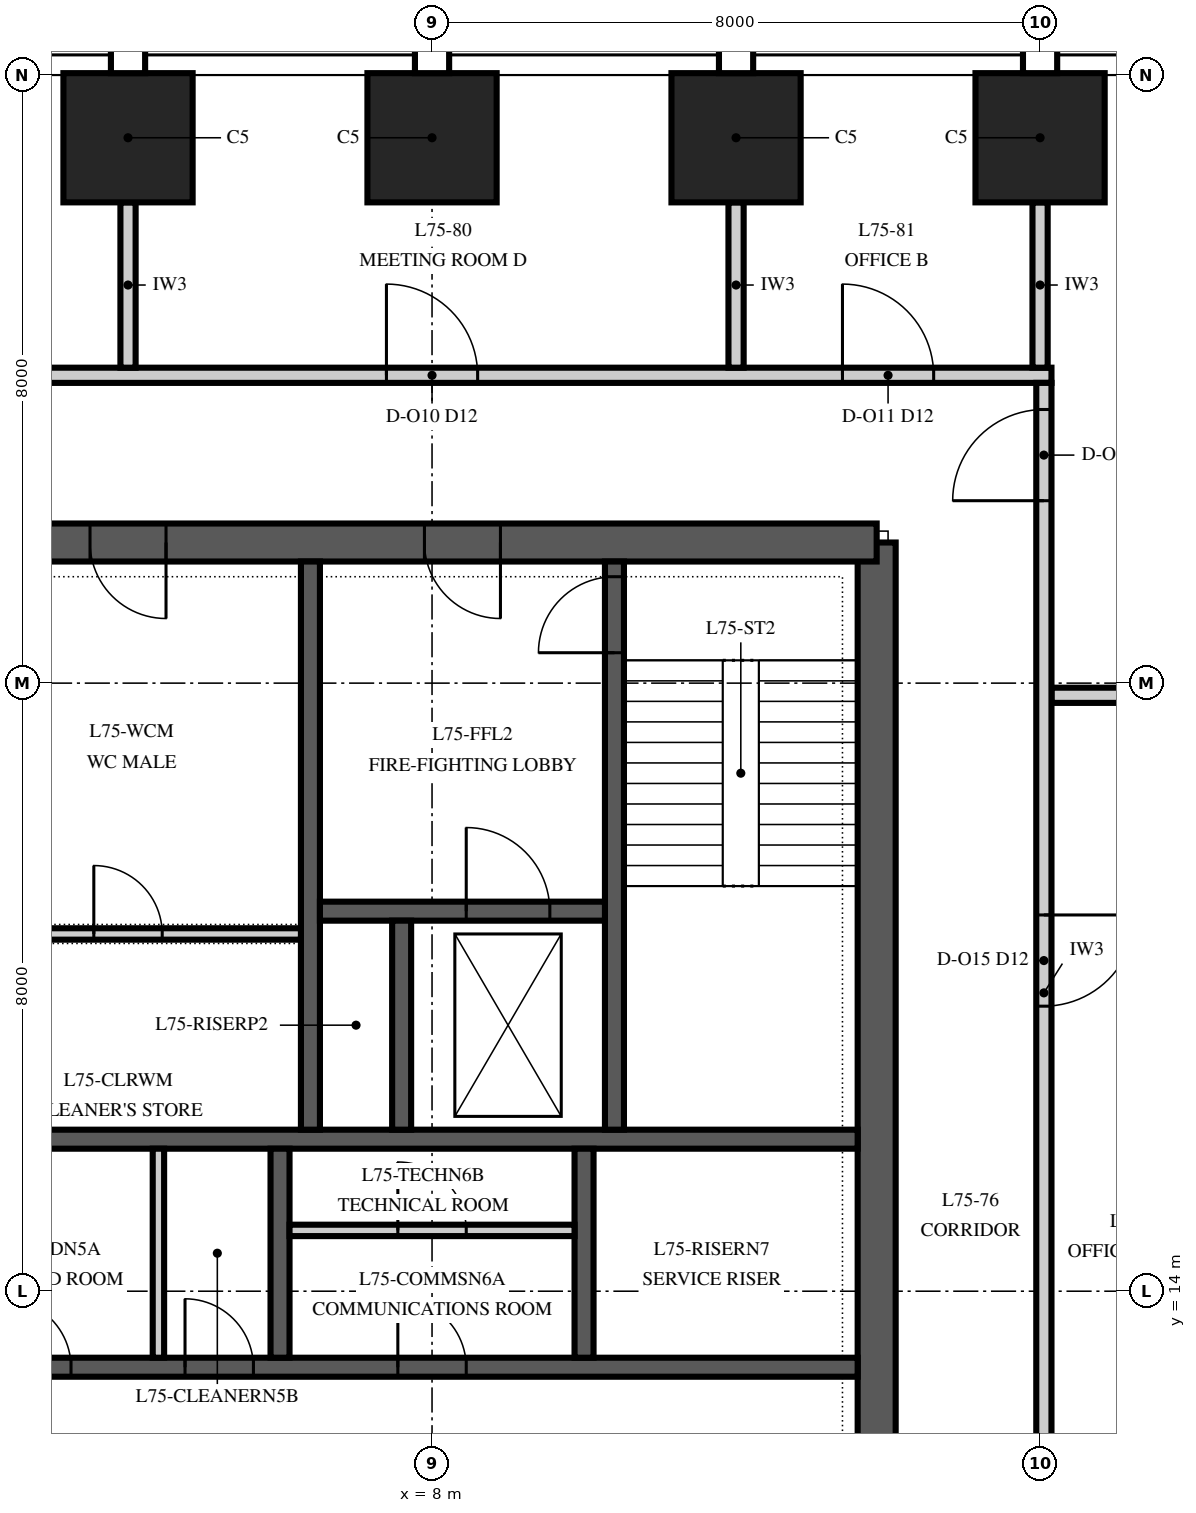
"""IFC4 building model, lengths in metres.
Left out: names, types, materials, properties, quantities, classifications, styles, units other than length and angle.
Written with IfcOpenShell. Run it as: python <this file> out.ifc"""

import sys

from ifc_helpers import new_model, si_unit, direction, frame, frame_2d, origin, origin_2d, place, context, subcontext, project, spatial, polyline, rectangle, outline, extrude, element, fill, save


model = new_model("IFC4")
c1 = context("Model", 3, precision=1e-05, world=origin(), true_north=direction((0.0, 1.0)))
c2 = subcontext(c1, "Body", "Model", "MODEL_VIEW")
j1 = project(units=[si_unit("LENGTHUNIT", "METRE"), si_unit("PLANEANGLEUNIT", "RADIAN")], contexts=[c1])
p1 = place(None, origin())
s1 = spatial("IfcSite", under=j1, at=p1, CompositionType="ELEMENT")
p2 = place(p1, origin())
s2 = spatial("IfcBuilding", under=s1, at=p2, CompositionType="ELEMENT")
p3 = place(p2, frame((0.0, 0.0, 320.0)))
s3 = spatial("IfcBuildingStorey", under=s2, at=p3, CompositionType="ELEMENT", Elevation=320.0)
for number, where, z_axis, x_axis in (
    (1, (16.0, 29.175, 0.0), (0.0, 0.0, 1.0), (-1.0, 0.0, 0.0)),
    (2, (12.0, 29.175, 0.0), (0.0, 0.0, 1.0), (-1.0, 0.0, 0.0)),
    (3, (8.0, 29.175, 0.0), (0.0, 0.0, 1.0), (-1.0, 0.0, 0.0)),
    (4, (4.0, 29.175, 0.0), (0.0, 0.0, 1.0), (-1.0, 0.0, 0.0)),
):
    element("IfcColumn", number, at=place(p3, frame(where, z_axis=z_axis, x_axis=x_axis)), inside=s3, PredefinedType="COLUMN", context=c2, shape_type="SweptSolid", body=[
        extrude(rectangle(XDim=1.7, YDim=1.7, at=origin_2d()), origin(), (0.0, 0.0, 1.0), 4.0),
    ])
p4 = place(p3, frame((13.85, 6.15, 0.0), z_axis=(0.0, 0.0, 1.0), x_axis=(0.0, 1.0, 0.0)))
e5 = element("IfcWall", 5, at=p4, inside=s3, PredefinedType="SHEAR", context=c2, shape_type="SweptSolid", body=[
    extrude(outline(polyline([(0.0, -0.25), (17.7, -0.25), (17.7, 0.0), (17.45, 0.0), (17.45, 0.25), (0.25, 0.25), (0.25, 0.0), (0.0, 0.0), (0.0, -0.25)])), origin(), (0.0, 0.0, 1.0), 4.0),
])
p5 = place(p4, frame((4.15, 0.0, 0.0)))
e6 = element("IfcOpeningElement", 6, at=p5, cuts=e5, PredefinedType="OPENING", context=c2, shape_type="SweptSolid", body=[
    extrude(rectangle(XDim=1.8, YDim=2.4, at=frame_2d((0.9, 1.2))), frame((0.0, 0.265, 0.0), z_axis=(0.0, -1.0, 0.0), x_axis=(1.0, 0.0, 0.0)), (0.0, 0.0, 1.0), 0.53),
])
p6 = place(p3, frame((13.85, 23.85, 0.0), z_axis=(0.0, 0.0, 1.0), x_axis=(-1.0, 0.0, 0.0)))
e7 = element("IfcWall", 7, at=p6, inside=s3, PredefinedType="SHEAR", context=c2, shape_type="SweptSolid", body=[
    extrude(rectangle(XDim=27.7, YDim=0.5, at=frame_2d((13.85, 0.0))), origin(), (0.0, 0.0, 1.0), 4.0),
])
p7 = place(p6, frame((21.75, 0.0, 0.0)))
e8 = element("IfcOpeningElement", 8, at=p7, cuts=e7, PredefinedType="OPENING", context=c2, shape_type="SweptSolid", body=[
    extrude(rectangle(XDim=1.0, YDim=2.1, at=frame_2d((0.5, 1.05))), frame((0.0, 0.265, 0.0), z_axis=(0.0, -1.0, 0.0), x_axis=(1.0, 0.0, 0.0)), (0.0, 0.0, 1.0), 0.53),
])
p8 = place(p6, frame((4.95, 0.0, 0.0)))
e9 = element("IfcOpeningElement", 9, at=p8, cuts=e7, PredefinedType="OPENING", context=c2, shape_type="SweptSolid", body=[
    extrude(rectangle(XDim=1.0, YDim=2.1, at=frame_2d((0.5, 1.05))), frame((0.0, 0.265, 0.0), z_axis=(0.0, -1.0, 0.0), x_axis=(1.0, 0.0, 0.0)), (0.0, 0.0, 1.0), 0.53),
])
p9 = place(p6, frame((17.35, 0.0, 0.0)))
e10 = element("IfcOpeningElement", 10, at=p9, cuts=e7, PredefinedType="OPENING", context=c2, shape_type="SweptSolid", body=[
    extrude(rectangle(XDim=1.0, YDim=2.1, at=frame_2d((0.5, 1.05))), frame((0.0, 0.265, 0.0), z_axis=(0.0, -1.0, 0.0), x_axis=(1.0, 0.0, 0.0)), (0.0, 0.0, 1.0), 0.53),
])
p10 = place(p6, frame((13.35, 0.0, 0.0)))
e11 = element("IfcOpeningElement", 11, at=p10, cuts=e7, PredefinedType="OPENING", context=c2, shape_type="SweptSolid", body=[
    extrude(rectangle(XDim=1.0, YDim=2.1, at=frame_2d((0.5, 1.05))), frame((0.0, 0.265, 0.0), z_axis=(0.0, -1.0, 0.0), x_axis=(1.0, 0.0, 0.0)), (0.0, 0.0, 1.0), 0.53),
])
p11 = place(p6, frame((9.35, 0.0, 0.0)))
e12 = element("IfcOpeningElement", 12, at=p11, cuts=e7, PredefinedType="OPENING", context=c2, shape_type="SweptSolid", body=[
    extrude(rectangle(XDim=1.0, YDim=2.1, at=frame_2d((0.5, 1.05))), frame((0.0, 0.265, 0.0), z_axis=(0.0, -1.0, 0.0), x_axis=(1.0, 0.0, 0.0)), (0.0, 0.0, 1.0), 0.53),
])
p12 = place(p3, frame((-13.6, 13.0, 0.0), z_axis=(0.0, 0.0, 1.0), x_axis=(1.0, 0.0, 0.0)))
e13 = element("IfcWall", 13, at=p12, inside=s3, PredefinedType="SHEAR", context=c2, shape_type="SweptSolid", body=[
    extrude(rectangle(XDim=27.2, YDim=0.25, at=frame_2d((13.6, 0.0))), origin(), (0.0, 0.0, 1.0), 4.0),
])
p13 = place(p12, frame((15.95, 0.0, 0.0)))
e14 = element("IfcOpeningElement", 14, at=p13, cuts=e13, PredefinedType="OPENING", context=c2, shape_type="SweptSolid", body=[
    extrude(rectangle(XDim=0.9, YDim=2.1, at=frame_2d((0.45, 1.05))), frame((0.0, 0.14, 0.0), z_axis=(0.0, -1.0, 0.0), x_axis=(1.0, 0.0, 0.0)), (0.0, 0.0, 1.0), 0.28),
])
p14 = place(p12, frame((18.35, 0.0, 0.0)))
e15 = element("IfcOpeningElement", 15, at=p14, cuts=e13, PredefinedType="OPENING", context=c2, shape_type="SweptSolid", body=[
    extrude(rectangle(XDim=0.9, YDim=2.1, at=frame_2d((0.45, 1.05))), frame((0.0, 0.14, 0.0), z_axis=(0.0, -1.0, 0.0), x_axis=(1.0, 0.0, 0.0)), (0.0, 0.0, 1.0), 0.28),
])
p15 = place(p12, frame((21.15, 0.0, 0.0)))
e16 = element("IfcOpeningElement", 16, at=p15, cuts=e13, PredefinedType="OPENING", context=c2, shape_type="SweptSolid", body=[
    extrude(rectangle(XDim=0.9, YDim=2.1, at=frame_2d((0.45, 1.05))), frame((0.0, 0.14, 0.0), z_axis=(0.0, -1.0, 0.0), x_axis=(1.0, 0.0, 0.0)), (0.0, 0.0, 1.0), 0.28),
])
p16 = place(p12, frame((0.55, 0.0, 0.0)))
e17 = element("IfcOpeningElement", 17, at=p16, cuts=e13, PredefinedType="OPENING", context=c2, shape_type="SweptSolid", body=[
    extrude(rectangle(XDim=0.9, YDim=2.1, at=frame_2d((0.45, 1.05))), frame((0.0, 0.14, 0.0), z_axis=(0.0, -1.0, 0.0), x_axis=(1.0, 0.0, 0.0)), (0.0, 0.0, 1.0), 0.28),
])
p17 = place(p12, frame((3.35, 0.0, 0.0)))
e18 = element("IfcOpeningElement", 18, at=p17, cuts=e13, PredefinedType="OPENING", context=c2, shape_type="SweptSolid", body=[
    extrude(rectangle(XDim=0.9, YDim=2.1, at=frame_2d((0.45, 1.05))), frame((0.0, 0.14, 0.0), z_axis=(0.0, -1.0, 0.0), x_axis=(1.0, 0.0, 0.0)), (0.0, 0.0, 1.0), 0.28),
])
p18 = place(p12, frame((6.15, 0.0, 0.0)))
e19 = element("IfcOpeningElement", 19, at=p18, cuts=e13, PredefinedType="OPENING", context=c2, shape_type="SweptSolid", body=[
    extrude(rectangle(XDim=0.9, YDim=2.1, at=frame_2d((0.45, 1.05))), frame((0.0, 0.14, 0.0), z_axis=(0.0, -1.0, 0.0), x_axis=(1.0, 0.0, 0.0)), (0.0, 0.0, 1.0), 0.28),
])
p19 = place(p3, frame((-13.6, 16.0, 0.0), z_axis=(0.0, 0.0, 1.0), x_axis=(1.0, 0.0, 0.0)))
e20 = element("IfcWall", 20, at=p19, inside=s3, PredefinedType="SHEAR", context=c2, shape_type="SweptSolid", body=[
    extrude(rectangle(XDim=27.2, YDim=0.25, at=frame_2d((13.6, 0.0))), origin(), (0.0, 0.0, 1.0), 4.0),
])
for number, where, z_axis, x_axis in (
    (21, (6.0, 13.125, 0.0), (0.0, 0.0, 1.0), (0.0, 1.0, 0.0)),
    (22, (10.0, 13.125, 0.0), (0.0, 0.0, 1.0), (0.0, 1.0, 0.0)),
):
    element("IfcWall", number, at=place(p3, frame(where, z_axis=z_axis, x_axis=x_axis)), inside=s3, PredefinedType="SHEAR", context=c2, shape_type="SweptSolid", body=[
        extrude(rectangle(XDim=2.75, YDim=0.25, at=frame_2d((1.375, 0.0))), origin(), (0.0, 0.0, 1.0), 4.0),
    ])
p20 = place(p3, frame((6.4, 16.125, 0.0), z_axis=(0.0, 0.0, 1.0), x_axis=(0.0, 1.0, 0.0)))
e23 = element("IfcWall", 23, at=p20, inside=s3, PredefinedType="SHEAR", context=c2, shape_type="SweptSolid", body=[
    extrude(rectangle(XDim=7.475, YDim=0.25, at=frame_2d((3.738, 0.0))), origin(), (0.0, 0.0, 1.0), 4.0),
])
p21 = place(p3, frame((10.4, 16.125, 0.0), z_axis=(0.0, 0.0, 1.0), x_axis=(0.0, 1.0, 0.0)))
e24 = element("IfcWall", 24, at=p21, inside=s3, PredefinedType="SHEAR", context=c2, shape_type="SweptSolid", body=[
    extrude(rectangle(XDim=7.475, YDim=0.25, at=frame_2d((3.738, 0.0))), origin(), (0.0, 0.0, 1.0), 4.0),
])
p22 = place(p21, frame((6.275, 0.0, 0.0)))
e25 = element("IfcOpeningElement", 25, at=p22, cuts=e24, PredefinedType="OPENING", context=c2, shape_type="SweptSolid", body=[
    extrude(rectangle(XDim=1.0, YDim=2.1, at=frame_2d((0.5, 1.05))), frame((0.0, 0.14, 0.0), z_axis=(0.0, -1.0, 0.0), x_axis=(1.0, 0.0, 0.0)), (0.0, 0.0, 1.0), 0.28),
])
p23 = place(p3, frame((6.525, 19.0, 0.0), z_axis=(0.0, 0.0, 1.0), x_axis=(1.0, 0.0, 0.0)))
e26 = element("IfcWall", 26, at=p23, inside=s3, PredefinedType="SHEAR", context=c2, shape_type="SweptSolid", body=[
    extrude(rectangle(XDim=3.75, YDim=0.25, at=frame_2d((1.875, 0.0))), origin(), (0.0, 0.0, 1.0), 4.0),
])
p24 = place(p23, frame((1.925, 0.0, 0.0)))
e27 = element("IfcOpeningElement", 27, at=p24, cuts=e26, PredefinedType="OPENING", context=c2, shape_type="SweptSolid", body=[
    extrude(rectangle(XDim=1.1, YDim=2.1, at=frame_2d((0.55, 1.05))), frame((0.0, 0.14, 0.0), z_axis=(0.0, -1.0, 0.0), x_axis=(1.0, 0.0, 0.0)), (0.0, 0.0, 1.0), 0.28),
])
p25 = place(p3, frame((7.6, 16.125, 0.0), z_axis=(0.0, 0.0, 1.0), x_axis=(0.0, 1.0, 0.0)))
e28 = element("IfcWall", 28, at=p25, inside=s3, PredefinedType="SHEAR", context=c2, shape_type="SweptSolid", body=[
    extrude(rectangle(XDim=2.75, YDim=0.25, at=frame_2d((1.375, 0.0))), origin(), (0.0, 0.0, 1.0), 4.0),
])
p26 = place(p3, frame((1.725, 18.7, 0.0), z_axis=(0.0, 0.0, 1.0), x_axis=(1.0, 0.0, 0.0)))
e29 = element("IfcWall", 29, at=p26, inside=s3, PredefinedType="PARTITIONING", context=c2, shape_type="SweptSolid", body=[
    extrude(rectangle(XDim=4.55, YDim=0.15, at=frame_2d((2.275, 0.0))), origin(), (0.0, 0.0, 1.0), 3.85),
])
p27 = place(p26, frame((1.825, 0.0, 0.0)))
e30 = element("IfcOpeningElement", 30, at=p27, cuts=e29, PredefinedType="OPENING", context=c2, shape_type="SweptSolid", body=[
    extrude(rectangle(XDim=0.9, YDim=2.1, at=frame_2d((0.45, 1.05))), frame((0.0, 0.09, 0.0), z_axis=(0.0, -1.0, 0.0), x_axis=(1.0, 0.0, 0.0)), (0.0, 0.0, 1.0), 0.18),
])
p28 = place(p3, frame((4.4, 13.125, 0.0), z_axis=(0.0, 0.0, 1.0), x_axis=(0.0, 1.0, 0.0)))
e31 = element("IfcWall", 31, at=p28, inside=s3, PredefinedType="PARTITIONING", context=c2, shape_type="SweptSolid", body=[
    extrude(rectangle(XDim=2.75, YDim=0.15, at=frame_2d((1.375, 0.0))), origin(), (0.0, 0.0, 1.0), 3.85),
])
p29 = place(p3, frame((6.125, 14.8, 0.0), z_axis=(0.0, 0.0, 1.0), x_axis=(1.0, 0.0, 0.0)))
e32 = element("IfcWall", 32, at=p29, inside=s3, PredefinedType="PARTITIONING", context=c2, shape_type="SweptSolid", body=[
    extrude(rectangle(XDim=3.75, YDim=0.15, at=frame_2d((1.875, 0.0))), origin(), (0.0, 0.0, 1.0), 3.85),
])
p30 = place(p29, frame((1.425, 0.0, 0.0)))
e33 = element("IfcOpeningElement", 33, at=p30, cuts=e32, PredefinedType="OPENING", context=c2, shape_type="SweptSolid", body=[
    extrude(rectangle(XDim=0.9, YDim=2.1, at=frame_2d((0.45, 1.05))), frame((0.0, 0.09, 0.0), z_axis=(0.0, -1.0, 0.0), x_axis=(1.0, 0.0, 0.0)), (0.0, 0.0, 1.0), 0.18),
])
p31 = place(p3, frame((16.15, 21.84, 0.0), z_axis=(0.0, 0.0, 1.0), x_axis=(1.0, 0.0, 0.0)))
e34 = element("IfcWall", 34, at=p31, inside=s3, PredefinedType="PARTITIONING", context=c2, shape_type="SweptSolid", body=[
    extrude(rectangle(XDim=7.174, YDim=0.2, at=frame_2d((3.587, 0.0))), origin(), (0.0, 0.0, 1.0), 3.13),
])
p32 = place(p3, frame((-16.15, 26.05, 0.0), z_axis=(0.0, 0.0, 1.0), x_axis=(1.0, 0.0, 0.0)))
e35 = element("IfcWall", 35, at=p32, inside=s3, PredefinedType="PARTITIONING", context=c2, shape_type="SweptSolid", body=[
    extrude(rectangle(XDim=32.3, YDim=0.2, at=frame_2d((16.15, 0.0))), origin(), (0.0, 0.0, 1.0), 3.318),
])
p33 = place(p32, frame((1.55, 0.0, 0.0)))
e36 = element("IfcOpeningElement", 36, at=p33, cuts=e35, PredefinedType="OPENING", context=c2, shape_type="SweptSolid", body=[
    extrude(rectangle(XDim=1.2, YDim=2.4, at=frame_2d((0.6, 1.2))), frame((0.0, 0.115, 0.0), z_axis=(0.0, -1.0, 0.0), x_axis=(1.0, 0.0, 0.0)), (0.0, 0.0, 1.0), 0.23),
])
p34 = place(p32, frame((7.55, 0.0, 0.0)))
e37 = element("IfcOpeningElement", 37, at=p34, cuts=e35, PredefinedType="OPENING", context=c2, shape_type="SweptSolid", body=[
    extrude(rectangle(XDim=1.2, YDim=2.4, at=frame_2d((0.6, 1.2))), frame((0.0, 0.115, 0.0), z_axis=(0.0, -1.0, 0.0), x_axis=(1.0, 0.0, 0.0)), (0.0, 0.0, 1.0), 0.23),
])
p35 = place(p32, frame((15.55, 0.0, 0.0)))
e38 = element("IfcOpeningElement", 38, at=p35, cuts=e35, PredefinedType="OPENING", context=c2, shape_type="SweptSolid", body=[
    extrude(rectangle(XDim=1.2, YDim=2.4, at=frame_2d((0.6, 1.2))), frame((0.0, 0.115, 0.0), z_axis=(0.0, -1.0, 0.0), x_axis=(1.0, 0.0, 0.0)), (0.0, 0.0, 1.0), 0.23),
])
p36 = place(p32, frame((23.55, 0.0, 0.0)))
e39 = element("IfcOpeningElement", 39, at=p36, cuts=e35, PredefinedType="OPENING", context=c2, shape_type="SweptSolid", body=[
    extrude(rectangle(XDim=1.2, YDim=2.4, at=frame_2d((0.6, 1.2))), frame((0.0, 0.115, 0.0), z_axis=(0.0, -1.0, 0.0), x_axis=(1.0, 0.0, 0.0)), (0.0, 0.0, 1.0), 0.23),
])
p37 = place(p32, frame((29.55, 0.0, 0.0)))
e40 = element("IfcOpeningElement", 40, at=p37, cuts=e35, PredefinedType="OPENING", context=c2, shape_type="SweptSolid", body=[
    extrude(rectangle(XDim=1.2, YDim=2.4, at=frame_2d((0.6, 1.2))), frame((0.0, 0.115, 0.0), z_axis=(0.0, -1.0, 0.0), x_axis=(1.0, 0.0, 0.0)), (0.0, 0.0, 1.0), 0.23),
])
for number, where, z_axis, x_axis in (
    (41, (4.0, 26.15, 0.0), (0.0, 0.0, 1.0), (0.0, 1.0, 0.0)),
    (42, (12.0, 26.15, 0.0), (0.0, 0.0, 1.0), (0.0, 1.0, 0.0)),
    (43, (16.0, 26.15, 0.0), (0.0, 0.0, 1.0), (0.0, 1.0, 0.0)),
):
    element("IfcWall", number, at=place(p3, frame(where, z_axis=z_axis, x_axis=x_axis)), inside=s3, PredefinedType="PARTITIONING", context=c2, shape_type="SweptSolid", body=[
        extrude(rectangle(XDim=2.175, YDim=0.2, at=frame_2d((1.087, 0.0))), origin(), (0.0, 0.0, 1.0), 3.318),
    ])
p38 = place(p3, frame((16.05, 9.9, 0.0), z_axis=(0.0, 0.0, 1.0), x_axis=(0.0, 1.0, 0.0)))
e44 = element("IfcWall", 44, at=p38, inside=s3, PredefinedType="PARTITIONING", context=c2, shape_type="SweptSolid", body=[
    extrude(rectangle(XDim=16.05, YDim=0.2, at=frame_2d((8.025, 0.0))), origin(), (0.0, 0.0, 1.0), 3.13),
])
p39 = place(p38, frame((14.5, 0.0, 0.0)))
e45 = element("IfcOpeningElement", 45, at=p39, cuts=e44, PredefinedType="OPENING", context=c2, shape_type="SweptSolid", body=[
    extrude(rectangle(XDim=1.2, YDim=2.4, at=frame_2d((0.6, 1.2))), frame((0.0, 0.115, 0.0), z_axis=(0.0, -1.0, 0.0), x_axis=(1.0, 0.0, 0.0)), (0.0, 0.0, 1.0), 0.23),
])
p40 = place(p38, frame((7.85, 0.0, 0.0)))
e46 = element("IfcOpeningElement", 46, at=p40, cuts=e44, PredefinedType="OPENING", context=c2, shape_type="SweptSolid", body=[
    extrude(rectangle(XDim=1.2, YDim=2.4, at=frame_2d((0.6, 1.2))), frame((0.0, 0.115, 0.0), z_axis=(0.0, -1.0, 0.0), x_axis=(1.0, 0.0, 0.0)), (0.0, 0.0, 1.0), 0.23),
])
p41 = place(p8, origin())
e47 = element("IfcDoor", 47, at=p41, inside=s3, OperationType="SINGLE_SWING_RIGHT", PredefinedType="DOOR", context=c2, shape_type="SweptSolid", body=[
    extrude(rectangle(XDim=1.0, YDim=2.1, at=frame_2d((0.5, 1.05))), frame((0.0, 0.25, 0.0), z_axis=(0.0, -1.0, 0.0), x_axis=(1.0, 0.0, 0.0)), (0.0, 0.0, 1.0), 0.5),
])
fill(e9, e47)
p42 = place(p11, origin())
e48 = element("IfcDoor", 48, at=p42, inside=s3, OperationType="SINGLE_SWING_LEFT", PredefinedType="DOOR", context=c2, shape_type="SweptSolid", body=[
    extrude(rectangle(XDim=1.0, YDim=2.1, at=frame_2d((0.5, 1.05))), frame((0.0, 0.25, 0.0), z_axis=(0.0, -1.0, 0.0), x_axis=(1.0, 0.0, 0.0)), (0.0, 0.0, 1.0), 0.5),
])
fill(e12, e48)
p43 = place(p22, origin())
e49 = element("IfcDoor", 49, at=p43, inside=s3, OperationType="SINGLE_SWING_LEFT", PredefinedType="DOOR", context=c2, shape_type="SweptSolid", body=[
    extrude(rectangle(XDim=1.0, YDim=2.1, at=frame_2d((0.5, 1.05))), frame((0.0, 0.125, 0.0), z_axis=(0.0, -1.0, 0.0), x_axis=(1.0, 0.0, 0.0)), (0.0, 0.0, 1.0), 0.25),
])
fill(e25, e49)
p44 = place(p24, origin())
e50 = element("IfcDoor", 50, at=p44, inside=s3, OperationType="SLIDING_TO_RIGHT", PredefinedType="DOOR", context=c2, shape_type="SweptSolid", body=[
    extrude(rectangle(XDim=1.1, YDim=2.1, at=frame_2d((0.55, 1.05))), frame((0.0, 0.125, 0.0), z_axis=(0.0, -1.0, 0.0), x_axis=(1.0, 0.0, 0.0)), (0.0, 0.0, 1.0), 0.25),
])
fill(e27, e50)
p45 = place(p13, origin())
e51 = element("IfcDoor", 51, at=p45, inside=s3, OperationType="SINGLE_SWING_LEFT", PredefinedType="DOOR", context=c2, shape_type="SweptSolid", body=[
    extrude(rectangle(XDim=0.9, YDim=2.1, at=frame_2d((0.45, 1.05))), frame((0.0, 0.125, 0.0), z_axis=(0.0, -1.0, 0.0), x_axis=(1.0, 0.0, 0.0)), (0.0, 0.0, 1.0), 0.25),
])
fill(e14, e51)
p46 = place(p14, origin())
e52 = element("IfcDoor", 52, at=p46, inside=s3, OperationType="SINGLE_SWING_LEFT", PredefinedType="DOOR", context=c2, shape_type="SweptSolid", body=[
    extrude(rectangle(XDim=0.9, YDim=2.1, at=frame_2d((0.45, 1.05))), frame((0.0, 0.125, 0.0), z_axis=(0.0, -1.0, 0.0), x_axis=(1.0, 0.0, 0.0)), (0.0, 0.0, 1.0), 0.25),
])
fill(e15, e52)
p47 = place(p15, origin())
e53 = element("IfcDoor", 53, at=p47, inside=s3, OperationType="SINGLE_SWING_LEFT", PredefinedType="DOOR", context=c2, shape_type="SweptSolid", body=[
    extrude(rectangle(XDim=0.9, YDim=2.1, at=frame_2d((0.45, 1.05))), frame((0.0, 0.125, 0.0), z_axis=(0.0, -1.0, 0.0), x_axis=(1.0, 0.0, 0.0)), (0.0, 0.0, 1.0), 0.25),
])
fill(e16, e53)
p48 = place(p30, origin())
e54 = element("IfcDoor", 54, at=p48, inside=s3, OperationType="SINGLE_SWING_LEFT", PredefinedType="DOOR", context=c2, shape_type="SweptSolid", body=[
    extrude(rectangle(XDim=0.9, YDim=2.1, at=frame_2d((0.45, 1.05))), frame((0.0, 0.075, 0.0), z_axis=(0.0, -1.0, 0.0), x_axis=(1.0, 0.0, 0.0)), (0.0, 0.0, 1.0), 0.149),
])
fill(e33, e54)
p49 = place(p27, origin())
e55 = element("IfcDoor", 55, at=p49, inside=s3, OperationType="SINGLE_SWING_LEFT", PredefinedType="DOOR", context=c2, shape_type="SweptSolid", body=[
    extrude(rectangle(XDim=0.9, YDim=2.1, at=frame_2d((0.45, 1.05))), frame((0.0, 0.075, 0.0), z_axis=(0.0, -1.0, 0.0), x_axis=(1.0, 0.0, 0.0)), (0.0, 0.0, 1.0), 0.149),
])
fill(e30, e55)
p50 = place(p36, origin())
e56 = element("IfcDoor", 56, at=p50, inside=s3, OperationType="SINGLE_SWING_LEFT", PredefinedType="DOOR", context=c2, shape_type="SweptSolid", body=[
    extrude(rectangle(XDim=1.2, YDim=2.4, at=frame_2d((0.6, 1.2))), frame((0.0, 0.1, 0.0), z_axis=(0.0, -1.0, 0.0), x_axis=(1.0, 0.0, 0.0)), (0.0, 0.0, 1.0), 0.199),
])
fill(e39, e56)
p51 = place(p37, origin())
e57 = element("IfcDoor", 57, at=p51, inside=s3, OperationType="SINGLE_SWING_LEFT", PredefinedType="DOOR", context=c2, shape_type="SweptSolid", body=[
    extrude(rectangle(XDim=1.2, YDim=2.4, at=frame_2d((0.6, 1.2))), frame((0.0, 0.1, 0.0), z_axis=(0.0, -1.0, 0.0), x_axis=(1.0, 0.0, 0.0)), (0.0, 0.0, 1.0), 0.199),
])
fill(e40, e57)
p52 = place(p39, origin())
e58 = element("IfcDoor", 58, at=p52, inside=s3, OperationType="SINGLE_SWING_LEFT", PredefinedType="DOOR", context=c2, shape_type="SweptSolid", body=[
    extrude(rectangle(XDim=1.2, YDim=2.4, at=frame_2d((0.6, 1.2))), frame((0.0, 0.1, 0.0), z_axis=(0.0, -1.0, 0.0), x_axis=(1.0, 0.0, 0.0)), (0.0, 0.0, 1.0), 0.199),
])
fill(e45, e58)
p53 = place(p40, frame((1.2, 0.0, 0.0), z_axis=(0.0, 0.0, 1.0), x_axis=(-1.0, 0.0, 0.0)))
e59 = element("IfcDoor", 59, at=p53, inside=s3, OperationType="SINGLE_SWING_LEFT", PredefinedType="DOOR", context=c2, shape_type="SweptSolid", body=[
    extrude(rectangle(XDim=1.2, YDim=2.4, at=frame_2d((0.6, 1.2))), frame((0.0, 0.1, 0.0), z_axis=(0.0, -1.0, 0.0), x_axis=(1.0, 0.0, 0.0)), (0.0, 0.0, 1.0), 0.199),
])
fill(e46, e59)
save(model, sys.argv[1])
